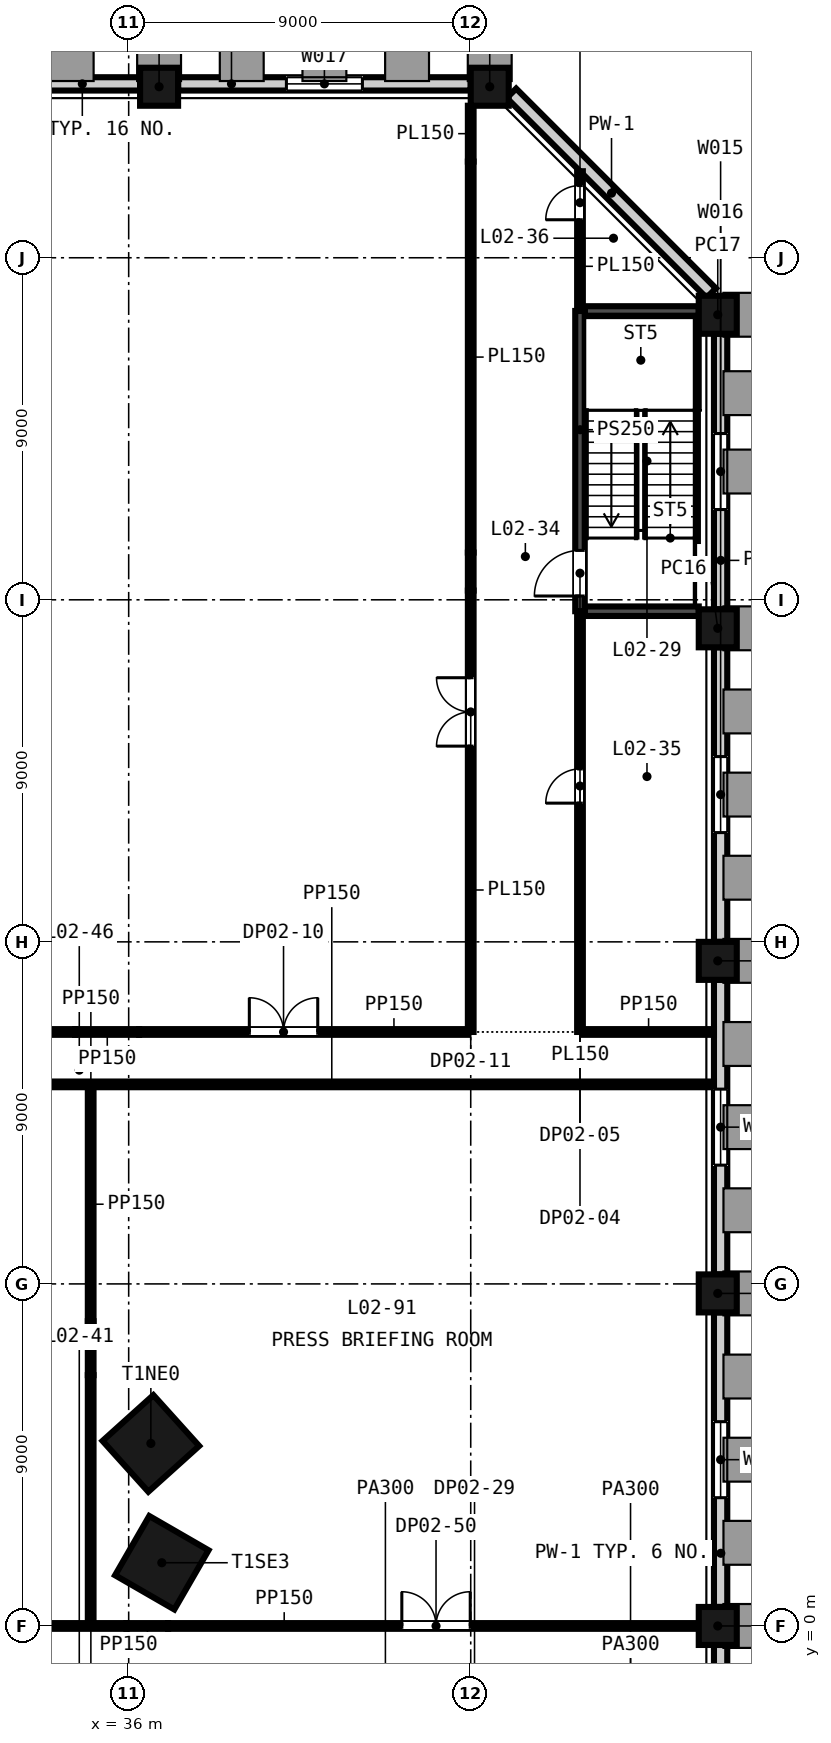
"""IFC4 building model, lengths in metres.
Left out: names, types, materials, properties, quantities, classifications, styles, units other than length and angle.
Written with IfcOpenShell. Run it as: python <this file> out.ifc"""

import sys

from ifc_helpers import new_model, si_unit, direction, frame, frame_2d, origin, origin_2d, place, context, subcontext, project, spatial, rectangle, extrude, element, fill, save


model = new_model("IFC4")
c1 = context("Model", 3, precision=1e-05, world=origin(), true_north=direction((0.0, 1.0)))
c2 = subcontext(c1, "Body", "Model", "MODEL_VIEW")
j1 = project(units=[si_unit("LENGTHUNIT", "METRE"), si_unit("PLANEANGLEUNIT", "RADIAN")], contexts=[c1])
p1 = place(None, origin())
s1 = spatial("IfcSite", under=j1, at=p1, CompositionType="ELEMENT")
p2 = place(p1, origin())
s2 = spatial("IfcBuilding", under=s1, at=p2, CompositionType="ELEMENT")
p3 = place(p2, frame((0.0, 0.0, 18.0)))
s3 = spatial("IfcBuildingStorey", under=s2, at=p3, CompositionType="ELEMENT", Elevation=18.0)
for number, where, z_axis, x_axis in (
    (1, (36.872, 1.663, -0.4), (0.0, 0.0, 1.0), (0.5, 0.866, 0.0)),
    (2, (36.584, 4.803, -0.4), (0.0, 0.0, 1.0), (-0.669, 0.743, 0.0)),
):
    element("IfcColumn", number, at=place(p3, frame(where, z_axis=z_axis, x_axis=x_axis)), inside=s3, PredefinedType="COLUMN", context=c2, shape_type="SweptSolid", body=[
        extrude(rectangle(XDim=1.8, YDim=1.8, at=origin_2d()), origin(), (0.0, 0.0, 1.0), 4.6),
    ])
for number, where, z_axis, x_axis in (
    (3, (51.5, 0.0, -0.4), (0.0, 0.0, 1.0), (0.0, 1.0, 0.0)),
    (4, (51.5, 8.75, -0.4), (0.0, 0.0, 1.0), (0.0, 1.0, 0.0)),
    (5, (51.5, 17.5, -0.4), (0.0, 0.0, 1.0), (0.0, 1.0, 0.0)),
    (6, (51.5, 26.25, -0.4), (0.0, 0.0, 1.0), (0.0, 1.0, 0.0)),
    (7, (51.5, 34.5, -0.4), (0.0, 0.0, 1.0), (0.0, 1.0, 0.0)),
    (8, (45.5, 40.5, -0.4), (0.0, 0.0, 1.0), (-1.0, 0.0, 0.0)),
    (9, (36.8, 40.5, -0.4), (0.0, 0.0, 1.0), (-1.0, 0.0, 0.0)),
):
    element("IfcColumn", number, at=place(p3, frame(where, z_axis=z_axis, x_axis=x_axis)), inside=s3, PredefinedType="COLUMN", context=c2, shape_type="SweptSolid", body=[
        extrude(rectangle(XDim=1.0, YDim=1.0, at=origin_2d()), origin(), (0.0, 0.0, 1.0), 4.6),
    ])
p4 = place(p3, frame((51.575, -8.2, -0.4), z_axis=(0.0, 0.0, 1.0), x_axis=(0.0, 1.0, 0.0)))
e10 = element("IfcWall", 10, at=p4, inside=s3, PredefinedType="SOLIDWALL", context=c2, shape_type="SweptSolid", body=[
    extrude(rectangle(XDim=7.7, YDim=0.35, at=frame_2d((3.85, 0.0))), origin(), (0.0, 0.0, 1.0), 3.7),
])
p5 = place(p4, frame((2.85, 0.0, 1.3)))
e11 = element("IfcOpeningElement", 11, at=p5, cuts=e10, PredefinedType="OPENING", context=c2, shape_type="SweptSolid", body=[
    extrude(rectangle(XDim=2.0, YDim=2.35, at=frame_2d((1.0, 1.175))), frame((0.0, 0.185, 0.0), z_axis=(0.0, -1.0, 0.0), x_axis=(1.0, 0.0, 0.0)), (0.0, 0.0, 1.0), 0.37),
])
p6 = place(p3, frame((51.575, 0.5, -0.4), z_axis=(0.0, 0.0, 1.0), x_axis=(0.0, 1.0, 0.0)))
e12 = element("IfcWall", 12, at=p6, inside=s3, PredefinedType="SOLIDWALL", context=c2, shape_type="SweptSolid", body=[
    extrude(rectangle(XDim=7.75, YDim=0.35, at=frame_2d((3.875, 0.0))), origin(), (0.0, 0.0, 1.0), 3.7),
])
p7 = place(p6, frame((2.875, 0.0, 1.3)))
e13 = element("IfcOpeningElement", 13, at=p7, cuts=e12, PredefinedType="OPENING", context=c2, shape_type="SweptSolid", body=[
    extrude(rectangle(XDim=2.0, YDim=2.35, at=frame_2d((1.0, 1.175))), frame((0.0, 0.185, 0.0), z_axis=(0.0, -1.0, 0.0), x_axis=(1.0, 0.0, 0.0)), (0.0, 0.0, 1.0), 0.37),
])
p8 = place(p3, frame((51.575, 9.25, -0.4), z_axis=(0.0, 0.0, 1.0), x_axis=(0.0, 1.0, 0.0)))
e14 = element("IfcWall", 14, at=p8, inside=s3, PredefinedType="SOLIDWALL", context=c2, shape_type="SweptSolid", body=[
    extrude(rectangle(XDim=7.75, YDim=0.35, at=frame_2d((3.875, 0.0))), origin(), (0.0, 0.0, 1.0), 3.7),
])
p9 = place(p8, frame((2.875, 0.0, 1.3)))
e15 = element("IfcOpeningElement", 15, at=p9, cuts=e14, PredefinedType="OPENING", context=c2, shape_type="SweptSolid", body=[
    extrude(rectangle(XDim=2.0, YDim=2.35, at=frame_2d((1.0, 1.175))), frame((0.0, 0.185, 0.0), z_axis=(0.0, -1.0, 0.0), x_axis=(1.0, 0.0, 0.0)), (0.0, 0.0, 1.0), 0.37),
])
p10 = place(p3, frame((51.575, 18.0, -0.4), z_axis=(0.0, 0.0, 1.0), x_axis=(0.0, 1.0, 0.0)))
e16 = element("IfcWall", 16, at=p10, inside=s3, PredefinedType="SOLIDWALL", context=c2, shape_type="SweptSolid", body=[
    extrude(rectangle(XDim=7.75, YDim=0.35, at=frame_2d((3.875, 0.0))), origin(), (0.0, 0.0, 1.0), 3.7),
])
p11 = place(p10, frame((2.875, 0.0, 1.3)))
e17 = element("IfcOpeningElement", 17, at=p11, cuts=e16, PredefinedType="OPENING", context=c2, shape_type="SweptSolid", body=[
    extrude(rectangle(XDim=2.0, YDim=2.35, at=frame_2d((1.0, 1.175))), frame((0.0, 0.185, 0.0), z_axis=(0.0, -1.0, 0.0), x_axis=(1.0, 0.0, 0.0)), (0.0, 0.0, 1.0), 0.37),
])
p12 = place(p3, frame((51.575, 26.75, -0.4), z_axis=(0.0, 0.0, 1.0), x_axis=(0.0, 1.0, 0.0)))
e18 = element("IfcWall", 18, at=p12, inside=s3, PredefinedType="SOLIDWALL", context=c2, shape_type="SweptSolid", body=[
    extrude(rectangle(XDim=7.25, YDim=0.35, at=frame_2d((3.625, 0.0))), origin(), (0.0, 0.0, 1.0), 3.7),
])
p13 = place(p12, frame((2.625, 0.0, 1.3)))
e19 = element("IfcOpeningElement", 19, at=p13, cuts=e18, PredefinedType="OPENING", context=c2, shape_type="SweptSolid", body=[
    extrude(rectangle(XDim=2.0, YDim=2.35, at=frame_2d((1.0, 1.175))), frame((0.0, 0.185, 0.0), z_axis=(0.0, -1.0, 0.0), x_axis=(1.0, 0.0, 0.0)), (0.0, 0.0, 1.0), 0.37),
])
p14 = place(p3, frame((51.327, 35.072, -0.4), z_axis=(0.0, 0.0, 1.0), x_axis=(-0.707106781187, 0.707106781187, 0.0)))
e20 = element("IfcWall", 20, at=p14, inside=s3, PredefinedType="SOLIDWALL", context=c2, shape_type="SweptSolid", body=[
    extrude(rectangle(XDim=7.433, YDim=0.35, at=frame_2d((3.716, 0.0))), origin(), (0.0, 0.0, 1.0), 3.7),
])
p15 = place(p3, frame((45.0, 40.575, -0.4), z_axis=(0.0, 0.0, 1.0), x_axis=(-1.0, 0.0, 0.0)))
e21 = element("IfcWall", 21, at=p15, inside=s3, PredefinedType="SOLIDWALL", context=c2, shape_type="SweptSolid", body=[
    extrude(rectangle(XDim=7.7, YDim=0.35, at=frame_2d((3.85, 0.0))), origin(), (0.0, 0.0, 1.0), 3.7),
])
p16 = place(p15, frame((2.85, 0.0, 1.3)))
e22 = element("IfcOpeningElement", 22, at=p16, cuts=e21, PredefinedType="OPENING", context=c2, shape_type="SweptSolid", body=[
    extrude(rectangle(XDim=2.0, YDim=2.35, at=frame_2d((1.0, 1.175))), frame((0.0, 0.185, 0.0), z_axis=(0.0, -1.0, 0.0), x_axis=(1.0, 0.0, 0.0)), (0.0, 0.0, 1.0), 0.37),
])
p17 = place(p3, frame((36.3, 40.575, -0.4), z_axis=(0.0, 0.0, 1.0), x_axis=(-1.0, 0.0, 0.0)))
e23 = element("IfcWall", 23, at=p17, inside=s3, PredefinedType="SOLIDWALL", context=c2, shape_type="SweptSolid", body=[
    extrude(rectangle(XDim=8.2, YDim=0.35, at=frame_2d((4.1, 0.0))), origin(), (0.0, 0.0, 1.0), 3.7),
])
p18 = place(p17, frame((3.1, 0.0, 1.3)))
e24 = element("IfcOpeningElement", 24, at=p18, cuts=e23, PredefinedType="OPENING", context=c2, shape_type="SweptSolid", body=[
    extrude(rectangle(XDim=2.0, YDim=2.35, at=frame_2d((1.0, 1.175))), frame((0.0, 0.185, 0.0), z_axis=(0.0, -1.0, 0.0), x_axis=(1.0, 0.0, 0.0)), (0.0, 0.0, 1.0), 0.37),
])
p19 = place(p3, frame((24.5, 0.0, 0.0), z_axis=(0.0, 0.0, 1.0), x_axis=(1.0, 0.0, 0.0)))
e25 = element("IfcWall", 25, at=p19, inside=s3, PredefinedType="PARTITIONING", context=c2, shape_type="SweptSolid", body=[
    extrude(rectangle(XDim=11.44, YDim=0.15, at=frame_2d((5.72, 0.0))), origin(), (0.0, 0.0, 1.0), 4.2),
])
p20 = place(p3, frame((35.94, 0.0, 0.0), z_axis=(0.0, 0.0, 1.0), x_axis=(1.0, 0.0, 0.0)))
e26 = element("IfcWall", 26, at=p20, inside=s3, PredefinedType="PARTITIONING", context=c2, shape_type="SweptSolid", body=[
    extrude(rectangle(XDim=1.097, YDim=0.15, at=frame_2d((0.548, 0.0))), origin(), (0.0, 0.0, 1.0), 3.2),
])
p21 = place(p3, frame((37.037, 0.0, 0.0), z_axis=(0.0, 0.0, 1.0), x_axis=(1.0, 0.0, 0.0)))
e27 = element("IfcWall", 27, at=p21, inside=s3, PredefinedType="PARTITIONING", context=c2, shape_type="SweptSolid", body=[
    extrude(rectangle(XDim=13.963, YDim=0.15, at=frame_2d((6.981, 0.0))), origin(), (0.0, 0.0, 1.0), 4.2),
])
p22 = place(p21, frame((6.15, 0.0, 0.0)))
e28 = element("IfcOpeningElement", 28, at=p22, cuts=e27, PredefinedType="OPENING", context=c2, shape_type="SweptSolid", body=[
    extrude(rectangle(XDim=1.8, YDim=2.4, at=frame_2d((0.9, 1.2))), frame((0.0, 0.085, 0.0), z_axis=(0.0, -1.0, 0.0), x_axis=(1.0, 0.0, 0.0)), (0.0, 0.0, 1.0), 0.17),
])
p23 = place(p3, frame((31.278, 14.25, 0.0), z_axis=(0.0, 0.0, 1.0), x_axis=(1.0, 0.0, 0.0)))
e29 = element("IfcWall", 29, at=p23, inside=s3, PredefinedType="PARTITIONING", context=c2, shape_type="SweptSolid", body=[
    extrude(rectangle(XDim=20.122, YDim=0.15, at=frame_2d((10.061, 0.0))), origin(), (0.0, 0.0, 1.0), 4.2),
])
p24 = place(p3, frame((28.148, 15.629, 0.0), z_axis=(0.0, 0.0, 1.0), x_axis=(1.0, 0.0, 0.0)))
e30 = element("IfcWall", 30, at=p24, inside=s3, PredefinedType="PARTITIONING", context=c2, shape_type="SweptSolid", body=[
    extrude(rectangle(XDim=6.441, YDim=0.15, at=frame_2d((3.221, 0.0))), origin(), (0.0, 0.0, 1.0), 4.2),
])
p25 = place(p3, frame((34.589, 15.629, 0.0), z_axis=(0.0, 0.0, 1.0), x_axis=(1.0, 0.0, 0.0)))
e31 = element("IfcWall", 31, at=p25, inside=s3, PredefinedType="PARTITIONING", context=c2, shape_type="SweptSolid", body=[
    extrude(rectangle(XDim=1.685, YDim=0.15, at=frame_2d((0.843, 0.0))), origin(), (0.0, 0.0, 1.0), 3.219),
])
p26 = place(p3, frame((36.274, 15.629, 0.0), z_axis=(0.0, 0.0, 1.0), x_axis=(1.0, 0.0, 0.0)))
e32 = element("IfcWall", 32, at=p26, inside=s3, PredefinedType="PARTITIONING", context=c2, shape_type="SweptSolid", body=[
    extrude(rectangle(XDim=8.651, YDim=0.15, at=frame_2d((4.325, 0.0))), origin(), (0.0, 0.0, 1.0), 4.2),
])
p27 = place(p26, frame((2.9, 0.0, 0.0)))
e33 = element("IfcOpeningElement", 33, at=p27, cuts=e32, PredefinedType="OPENING", context=c2, shape_type="SweptSolid", body=[
    extrude(rectangle(XDim=1.8, YDim=2.4, at=frame_2d((0.9, 1.2))), frame((0.0, 0.085, 0.0), z_axis=(0.0, -1.0, 0.0), x_axis=(1.0, 0.0, 0.0)), (0.0, 0.0, 1.0), 0.17),
])
p28 = place(p3, frame((47.95, 15.629, 0.0), z_axis=(0.0, 0.0, 1.0), x_axis=(1.0, 0.0, 0.0)))
e34 = element("IfcWall", 34, at=p28, inside=s3, PredefinedType="PARTITIONING", context=c2, shape_type="SweptSolid", body=[
    extrude(rectangle(XDim=3.45, YDim=0.15, at=frame_2d((1.725, 0.0))), origin(), (0.0, 0.0, 1.0), 4.2),
])
for number, where, z_axis, x_axis in (
    (35, (48.0, 26.7, 0.0), (0.0, 0.0, 1.0), (1.0, 0.0, 0.0)),
    (36, (48.0, 34.6, 0.0), (0.0, 0.0, 1.0), (1.0, 0.0, 0.0)),
):
    element("IfcWall", number, at=place(p3, frame(where, z_axis=z_axis, x_axis=x_axis)), inside=s3, PredefinedType="SHEAR", context=c2, shape_type="SweptSolid", body=[
        extrude(rectangle(XDim=3.0, YDim=0.25, at=frame_2d((1.5, 0.0))), origin(), (0.0, 0.0, 1.0), 4.2),
    ])
p29 = place(p3, frame((35.0, 0.075, 0.0), z_axis=(0.0, 0.0, 1.0), x_axis=(0.0, 1.0, 0.0)))
e37 = element("IfcWall", 37, at=p29, inside=s3, PredefinedType="PARTITIONING", context=c2, shape_type="SweptSolid", body=[
    extrude(rectangle(XDim=6.524, YDim=0.15, at=frame_2d((3.262, 0.0))), origin(), (0.0, 0.0, 1.0), 4.2),
])
p30 = place(p3, frame((35.0, 6.599, 0.0), z_axis=(0.0, 0.0, 1.0), x_axis=(0.0, 1.0, 0.0)))
e38 = element("IfcWall", 38, at=p30, inside=s3, PredefinedType="PARTITIONING", context=c2, shape_type="SweptSolid", body=[
    extrude(rectangle(XDim=1.42, YDim=0.15, at=frame_2d((0.71, 0.0))), origin(), (0.0, 0.0, 1.0), 3.2),
])
p31 = place(p3, frame((35.0, 8.019, 0.0), z_axis=(0.0, 0.0, 1.0), x_axis=(0.0, 1.0, 0.0)))
e39 = element("IfcWall", 39, at=p31, inside=s3, PredefinedType="PARTITIONING", context=c2, shape_type="SweptSolid", body=[
    extrude(rectangle(XDim=6.156, YDim=0.15, at=frame_2d((3.078, 0.0))), origin(), (0.0, 0.0, 1.0), 4.2),
])
p32 = place(p3, frame((45.0, 15.629, 0.0), z_axis=(0.0, 0.0, 1.0), x_axis=(0.0, 1.0, 0.0)))
e40 = element("IfcWall", 40, at=p32, inside=s3, PredefinedType="PARTITIONING", context=c2, shape_type="SweptSolid", body=[
    extrude(rectangle(XDim=11.614, YDim=0.15, at=frame_2d((5.807, 0.0))), origin(), (0.0, 0.0, 1.0), 4.2),
])
p33 = place(p32, frame((7.521, 0.0, 0.0)))
e41 = element("IfcOpeningElement", 41, at=p33, cuts=e40, PredefinedType="OPENING", context=c2, shape_type="SweptSolid", body=[
    extrude(rectangle(XDim=1.8, YDim=2.4, at=frame_2d((0.9, 1.2))), frame((0.0, 0.085, 0.0), z_axis=(0.0, -1.0, 0.0), x_axis=(1.0, 0.0, 0.0)), (0.0, 0.0, 1.0), 0.17),
])
p34 = place(p3, frame((45.0, 27.243, 0.0), z_axis=(0.0, 0.0, 1.0), x_axis=(0.0, 1.0, 0.0)))
e42 = element("IfcWall", 42, at=p34, inside=s3, PredefinedType="PARTITIONING", context=c2, shape_type="SweptSolid", body=[
    extrude(rectangle(XDim=1.0, YDim=0.15, at=frame_2d((0.5, 0.0))), origin(), (0.0, 0.0, 1.0), 3.111),
])
p35 = place(p3, frame((45.0, 28.243, 0.0), z_axis=(0.0, 0.0, 1.0), x_axis=(0.0, 1.0, 0.0)))
e43 = element("IfcWall", 43, at=p35, inside=s3, PredefinedType="PARTITIONING", context=c2, shape_type="SweptSolid", body=[
    extrude(rectangle(XDim=10.288, YDim=0.15, at=frame_2d((5.144, 0.0))), origin(), (0.0, 0.0, 1.0), 4.2),
])
p36 = place(p3, frame((45.0, 38.531, 0.0), z_axis=(0.0, 0.0, 1.0), x_axis=(0.0, 1.0, 0.0)))
e44 = element("IfcWall", 44, at=p36, inside=s3, PredefinedType="PARTITIONING", context=c2, shape_type="SweptSolid", body=[
    extrude(rectangle(XDim=1.469, YDim=0.15, at=frame_2d((0.735, 0.0))), origin(), (0.0, 0.0, 1.0), 3.111),
])
p37 = place(p3, frame((47.875, 15.629, 0.0), z_axis=(0.0, 0.0, 1.0), x_axis=(0.0, 1.0, 0.0)))
e45 = element("IfcWall", 45, at=p37, inside=s3, PredefinedType="PARTITIONING", context=c2, shape_type="SweptSolid", body=[
    extrude(rectangle(XDim=11.071, YDim=0.15, at=frame_2d((5.535, 0.0))), origin(), (0.0, 0.0, 1.0), 4.2),
])
p38 = place(p37, frame((6.021, 0.0, 0.0)))
e46 = element("IfcOpeningElement", 46, at=p38, cuts=e45, PredefinedType="OPENING", context=c2, shape_type="SweptSolid", body=[
    extrude(rectangle(XDim=0.9, YDim=2.1, at=frame_2d((0.45, 1.05))), frame((0.0, 0.085, 0.0), z_axis=(0.0, -1.0, 0.0), x_axis=(1.0, 0.0, 0.0)), (0.0, 0.0, 1.0), 0.17),
])
p39 = place(p3, frame((47.875, 26.7, 0.0), z_axis=(0.0, 0.0, 1.0), x_axis=(0.0, 1.0, 0.0)))
e47 = element("IfcWall", 47, at=p39, inside=s3, PredefinedType="SHEAR", context=c2, shape_type="SweptSolid", body=[
    extrude(rectangle(XDim=7.9, YDim=0.25, at=frame_2d((3.95, 0.0))), origin(), (0.0, 0.0, 1.0), 4.2),
])
p40 = place(p39, frame((0.4, 0.0, 0.0)))
e48 = element("IfcOpeningElement", 48, at=p40, cuts=e47, PredefinedType="OPENING", context=c2, shape_type="SweptSolid", body=[
    extrude(rectangle(XDim=1.2, YDim=2.1, at=frame_2d((0.6, 1.05))), frame((0.0, 0.135, 0.0), z_axis=(0.0, -1.0, 0.0), x_axis=(1.0, 0.0, 0.0)), (0.0, 0.0, 1.0), 0.27),
])
p41 = place(p3, frame((47.875, 34.6, 0.0), z_axis=(0.0, 0.0, 1.0), x_axis=(0.0, 1.0, 0.0)))
e49 = element("IfcWall", 49, at=p41, inside=s3, PredefinedType="PARTITIONING", context=c2, shape_type="SweptSolid", body=[
    extrude(rectangle(XDim=3.677, YDim=0.15, at=frame_2d((1.838, 0.0))), origin(), (0.0, 0.0, 1.0), 3.667),
])
p42 = place(p41, frame((2.4, 0.0, 0.0)))
e50 = element("IfcOpeningElement", 50, at=p42, cuts=e49, PredefinedType="OPENING", context=c2, shape_type="SweptSolid", body=[
    extrude(rectangle(XDim=0.9, YDim=2.1, at=frame_2d((0.45, 1.05))), frame((0.0, 0.085, 0.0), z_axis=(0.0, -1.0, 0.0), x_axis=(1.0, 0.0, 0.0)), (0.0, 0.0, 1.0), 0.17),
])
p43 = place(p7, origin())
e51 = element("IfcWindow", 51, at=p43, inside=s3, PartitioningType="SINGLE_PANEL", PredefinedType="WINDOW", context=c2, shape_type="SweptSolid", body=[
    extrude(rectangle(XDim=2.0, YDim=2.35, at=frame_2d((1.0, 1.175))), frame((0.0, 0.03, 0.0), z_axis=(0.0, -1.0, 0.0), x_axis=(1.0, 0.0, 0.0)), (0.0, 0.0, 1.0), 0.06),
])
fill(e13, e51)
p44 = place(p9, origin())
e52 = element("IfcWindow", 52, at=p44, inside=s3, PartitioningType="SINGLE_PANEL", PredefinedType="WINDOW", context=c2, shape_type="SweptSolid", body=[
    extrude(rectangle(XDim=2.0, YDim=2.35, at=frame_2d((1.0, 1.175))), frame((0.0, 0.03, 0.0), z_axis=(0.0, -1.0, 0.0), x_axis=(1.0, 0.0, 0.0)), (0.0, 0.0, 1.0), 0.06),
])
fill(e15, e52)
p45 = place(p11, origin())
e53 = element("IfcWindow", 53, at=p45, inside=s3, PartitioningType="SINGLE_PANEL", PredefinedType="WINDOW", context=c2, shape_type="SweptSolid", body=[
    extrude(rectangle(XDim=2.0, YDim=2.35, at=frame_2d((1.0, 1.175))), frame((0.0, 0.03, 0.0), z_axis=(0.0, -1.0, 0.0), x_axis=(1.0, 0.0, 0.0)), (0.0, 0.0, 1.0), 0.06),
])
fill(e17, e53)
p46 = place(p13, origin())
e54 = element("IfcWindow", 54, at=p46, inside=s3, PartitioningType="SINGLE_PANEL", PredefinedType="WINDOW", context=c2, shape_type="SweptSolid", body=[
    extrude(rectangle(XDim=2.0, YDim=2.35, at=frame_2d((1.0, 1.175))), frame((0.0, 0.03, 0.0), z_axis=(0.0, -1.0, 0.0), x_axis=(1.0, 0.0, 0.0)), (0.0, 0.0, 1.0), 0.06),
])
fill(e19, e54)
p47 = place(p16, origin())
e55 = element("IfcWindow", 55, at=p47, inside=s3, PartitioningType="SINGLE_PANEL", PredefinedType="WINDOW", context=c2, shape_type="SweptSolid", body=[
    extrude(rectangle(XDim=2.0, YDim=2.35, at=frame_2d((1.0, 1.175))), frame((0.0, 0.03, 0.0), z_axis=(0.0, -1.0, 0.0), x_axis=(1.0, 0.0, 0.0)), (0.0, 0.0, 1.0), 0.06),
])
fill(e22, e55)
p48 = place(p40, origin())
e56 = element("IfcDoor", 56, at=p48, inside=s3, OperationType="SINGLE_SWING_LEFT", PredefinedType="DOOR", context=c2, shape_type="SweptSolid", body=[
    extrude(rectangle(XDim=1.2, YDim=2.1, at=frame_2d((0.6, 1.05))), frame((0.0, 0.025, 0.0), z_axis=(0.0, -1.0, 0.0), x_axis=(1.0, 0.0, 0.0)), (0.0, 0.0, 1.0), 0.05),
])
fill(e48, e56)
p49 = place(p38, origin())
e57 = element("IfcDoor", 57, at=p49, inside=s3, OperationType="SINGLE_SWING_LEFT", PredefinedType="DOOR", context=c2, shape_type="SweptSolid", body=[
    extrude(rectangle(XDim=0.9, YDim=2.1, at=frame_2d((0.45, 1.05))), frame((0.0, 0.025, 0.0), z_axis=(0.0, -1.0, 0.0), x_axis=(1.0, 0.0, 0.0)), (0.0, 0.0, 1.0), 0.05),
])
fill(e46, e57)
p50 = place(p42, origin())
e58 = element("IfcDoor", 58, at=p50, inside=s3, OperationType="SINGLE_SWING_LEFT", PredefinedType="DOOR", context=c2, shape_type="SweptSolid", body=[
    extrude(rectangle(XDim=0.9, YDim=2.1, at=frame_2d((0.45, 1.05))), frame((0.0, 0.025, 0.0), z_axis=(0.0, -1.0, 0.0), x_axis=(1.0, 0.0, 0.0)), (0.0, 0.0, 1.0), 0.05),
])
fill(e50, e58)
p51 = place(p27, origin())
e59 = element("IfcDoor", 59, at=p51, inside=s3, OperationType="SINGLE_SWING_LEFT", PredefinedType="DOOR", context=c2, shape_type="SweptSolid", body=[
    extrude(rectangle(XDim=1.8, YDim=2.4, at=frame_2d((0.9, 1.2))), frame((0.0, 0.025, 0.0), z_axis=(0.0, -1.0, 0.0), x_axis=(1.0, 0.0, 0.0)), (0.0, 0.0, 1.0), 0.05),
])
fill(e33, e59)
p52 = place(p33, origin())
e60 = element("IfcDoor", 60, at=p52, inside=s3, OperationType="SINGLE_SWING_LEFT", PredefinedType="DOOR", context=c2, shape_type="SweptSolid", body=[
    extrude(rectangle(XDim=1.8, YDim=2.4, at=frame_2d((0.9, 1.2))), frame((0.0, 0.025, 0.0), z_axis=(0.0, -1.0, 0.0), x_axis=(1.0, 0.0, 0.0)), (0.0, 0.0, 1.0), 0.05),
])
fill(e41, e60)
p53 = place(p22, origin())
e61 = element("IfcDoor", 61, at=p53, inside=s3, OperationType="SINGLE_SWING_LEFT", PredefinedType="DOOR", context=c2, shape_type="SweptSolid", body=[
    extrude(rectangle(XDim=1.8, YDim=2.4, at=frame_2d((0.9, 1.2))), frame((0.0, 0.025, 0.0), z_axis=(0.0, -1.0, 0.0), x_axis=(1.0, 0.0, 0.0)), (0.0, 0.0, 1.0), 0.05),
])
fill(e28, e61)
save(model, sys.argv[1])
